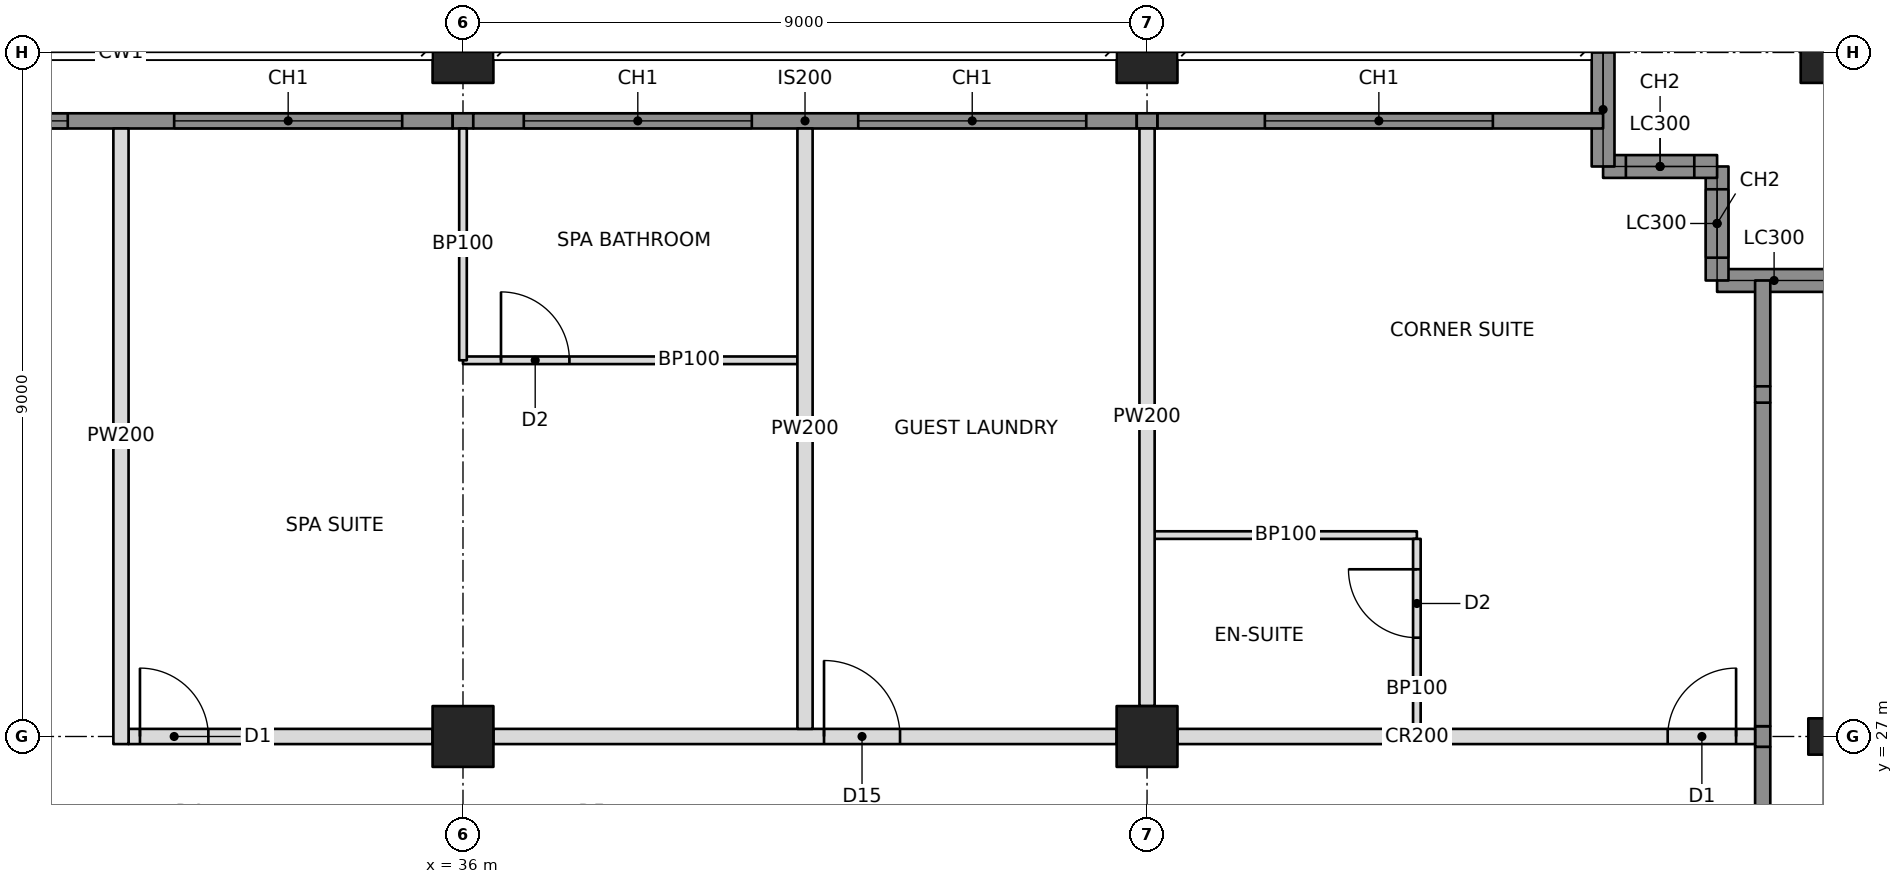
"""IFC4 building model, lengths in metres.
Left out: names, types, materials, properties, quantities, classifications, styles, units other than length and angle.
Written with IfcOpenShell. Run it as: python <this file> out.ifc"""

import sys

from ifc_helpers import new_model, si_unit, direction, frame, frame_2d, origin, origin_2d, place, context, subcontext, project, spatial, rectangle, hollow_rectangle, i_section, extrude, element, fill, save


model = new_model("IFC4")
c1 = context("Model", 3, precision=1e-05, world=origin(), true_north=direction((0.0, 1.0)))
c2 = subcontext(c1, "Body", "Model", "MODEL_VIEW")
j1 = project(units=[si_unit("LENGTHUNIT", "METRE"), si_unit("PLANEANGLEUNIT", "RADIAN")], contexts=[c1])
p1 = place(None, origin())
s1 = spatial("IfcSite", under=j1, at=p1, CompositionType="ELEMENT")
p2 = place(p1, origin())
s2 = spatial("IfcBuilding", under=s1, at=p2, CompositionType="ELEMENT")
p3 = place(p2, frame((0.0, 0.0, 51.8)))
s3 = spatial("IfcBuildingStorey", under=s2, at=p3, CompositionType="ELEMENT", Elevation=51.8)
for number, where, z_axis, x_axis in (
    (1, (36.0, 27.0, 0.0), (0.0, 0.0, 1.0), (1.0, 0.0, 0.0)),
    (2, (36.0, 36.0, 0.0), (0.0, 0.0, 1.0), (1.0, 0.0, 0.0)),
    (3, (45.0, 27.0, 0.0), (0.0, 0.0, 1.0), (0.0, 1.0, 0.0)),
    (4, (45.0, 36.0, 0.0), (0.0, 0.0, 1.0), (1.0, 0.0, 0.0)),
):
    element("IfcColumn", number, at=place(p3, frame(where, z_axis=z_axis, x_axis=x_axis)), inside=s3, PredefinedType="COLUMN", context=c2, shape_type="SweptSolid", body=[
        extrude(hollow_rectangle(XDim=0.8, YDim=0.8, WallThickness=0.1, at=origin_2d()), origin(), (0.0, 0.0, 1.0), 3.4),
    ])
p4 = place(p3, frame((54.0, 27.0, 0.0), z_axis=(0.0, 0.0, 1.0), x_axis=(0.0, 1.0, 0.0)))
e5 = element("IfcColumn", 5, at=p4, inside=s3, PredefinedType="COLUMN", context=c2, shape_type="SweptSolid", body=[
    extrude(i_section(OverallWidth=0.478, OverallDepth=0.599, WebThickness=0.1, FlangeThickness=0.14, at=origin_2d()), origin(), (0.0, 0.0, 1.0), 3.4),
])
p5 = place(p3, frame((54.0, 36.0, 0.0), z_axis=(0.0, 0.0, 1.0), x_axis=(1.0, 0.0, 0.0)))
e6 = element("IfcColumn", 6, at=p5, inside=s3, PredefinedType="COLUMN", context=c2, shape_type="SweptSolid", body=[
    extrude(hollow_rectangle(XDim=0.8, YDim=0.8, WallThickness=0.1, at=origin_2d()), origin(), (0.0, 0.0, 1.0), 3.4),
])
p6 = place(p3, frame((54.0, 33.0, 0.0), z_axis=(0.0, 0.0, 1.0), x_axis=(-1.0, 0.0, 0.0)))
e7 = element("IfcWall", 7, at=p6, inside=s3, PredefinedType="SOLIDWALL", context=c2, shape_type="SweptSolid", body=[
    extrude(rectangle(XDim=1.5, YDim=0.3, at=frame_2d((0.75, 0.0))), origin(), (0.0, 0.0, 1.0), 2.42),
])
p7 = place(p3, frame((52.5, 33.0, 0.0), z_axis=(0.0, 0.0, 1.0), x_axis=(0.0, 1.0, 0.0)))
e8 = element("IfcWall", 8, at=p7, inside=s3, PredefinedType="SOLIDWALL", context=c2, shape_type="SweptSolid", body=[
    extrude(rectangle(XDim=1.5, YDim=0.3, at=frame_2d((0.75, 0.0))), origin(), (0.0, 0.0, 1.0), 3.2),
])
p8 = place(p7, frame((0.3, 0.0, 0.6)))
e9 = element("IfcOpeningElement", 9, at=p8, cuts=e8, PredefinedType="OPENING", context=c2, shape_type="SweptSolid", body=[
    extrude(rectangle(XDim=0.9, YDim=2.2, at=frame_2d((0.45, 1.1))), frame((0.0, 0.16, 0.0), z_axis=(0.0, -1.0, 0.0), x_axis=(1.0, 0.0, 0.0)), (0.0, 0.0, 1.0), 0.32),
])
p9 = place(p3, frame((52.5, 34.5, 0.0), z_axis=(0.0, 0.0, 1.0), x_axis=(-1.0, 0.0, 0.0)))
e10 = element("IfcWall", 10, at=p9, inside=s3, PredefinedType="SOLIDWALL", context=c2, shape_type="SweptSolid", body=[
    extrude(rectangle(XDim=1.5, YDim=0.3, at=frame_2d((0.75, 0.0))), origin(), (0.0, 0.0, 1.0), 3.2),
])
p10 = place(p9, frame((0.3, 0.0, 0.6)))
e11 = element("IfcOpeningElement", 11, at=p10, cuts=e10, PredefinedType="OPENING", context=c2, shape_type="SweptSolid", body=[
    extrude(rectangle(XDim=0.9, YDim=2.2, at=frame_2d((0.45, 1.1))), frame((0.0, 0.16, 0.0), z_axis=(0.0, -1.0, 0.0), x_axis=(1.0, 0.0, 0.0)), (0.0, 0.0, 1.0), 0.32),
])
p11 = place(p3, frame((51.0, 34.5, 0.0), z_axis=(0.0, 0.0, 1.0), x_axis=(0.0, 1.0, 0.0)))
e12 = element("IfcWall", 12, at=p11, inside=s3, PredefinedType="SOLIDWALL", context=c2, shape_type="SweptSolid", body=[
    extrude(rectangle(XDim=1.5, YDim=0.3, at=frame_2d((0.75, 0.0))), origin(), (0.0, 0.0, 1.0), 2.42),
])
p12 = place(p3, frame((31.6, 27.0, 0.0), z_axis=(0.0, 0.0, 1.0), x_axis=(1.0, 0.0, 0.0)))
e13 = element("IfcWall", 13, at=p12, inside=s3, PredefinedType="PARTITIONING", context=c2, shape_type="SweptSolid", body=[
    extrude(rectangle(XDim=4.0, YDim=0.2, at=frame_2d((2.0, 0.0))), origin(), (0.0, 0.0, 1.0), 2.405),
])
p13 = place(p12, frame((0.15, 0.0, 0.0)))
e14 = element("IfcOpeningElement", 14, at=p13, cuts=e13, PredefinedType="OPENING", context=c2, shape_type="SweptSolid", body=[
    extrude(rectangle(XDim=0.9, YDim=2.1, at=frame_2d((0.45, 1.05))), frame((0.0, 0.11, 0.0), z_axis=(0.0, -1.0, 0.0), x_axis=(1.0, 0.0, 0.0)), (0.0, 0.0, 1.0), 0.22),
])
p14 = place(p3, frame((36.4, 27.0, 0.0), z_axis=(0.0, 0.0, 1.0), x_axis=(1.0, 0.0, 0.0)))
e15 = element("IfcWall", 15, at=p14, inside=s3, PredefinedType="PARTITIONING", context=c2, shape_type="SweptSolid", body=[
    extrude(rectangle(XDim=8.2, YDim=0.2, at=frame_2d((4.1, 0.0))), origin(), (0.0, 0.0, 1.0), 2.438),
])
p15 = place(p14, frame((4.35, 0.0, 0.0)))
e16 = element("IfcOpeningElement", 16, at=p15, cuts=e15, PredefinedType="OPENING", context=c2, shape_type="SweptSolid", body=[
    extrude(rectangle(XDim=1.0, YDim=2.1, at=frame_2d((0.5, 1.05))), frame((0.0, 0.11, 0.0), z_axis=(0.0, -1.0, 0.0), x_axis=(1.0, 0.0, 0.0)), (0.0, 0.0, 1.0), 0.22),
])
p16 = place(p3, frame((45.4, 27.0, 0.0), z_axis=(0.0, 0.0, 1.0), x_axis=(1.0, 0.0, 0.0)))
e17 = element("IfcWall", 17, at=p16, inside=s3, PredefinedType="PARTITIONING", context=c2, shape_type="SweptSolid", body=[
    extrude(rectangle(XDim=7.6, YDim=0.2, at=frame_2d((3.8, 0.0))), origin(), (0.0, 0.0, 1.0), 2.438),
])
p17 = place(p16, frame((6.45, 0.0, 0.0)))
e18 = element("IfcOpeningElement", 18, at=p17, cuts=e17, PredefinedType="OPENING", context=c2, shape_type="SweptSolid", body=[
    extrude(rectangle(XDim=0.9, YDim=2.1, at=frame_2d((0.45, 1.05))), frame((0.0, 0.11, 0.0), z_axis=(0.0, -1.0, 0.0), x_axis=(1.0, 0.0, 0.0)), (0.0, 0.0, 1.0), 0.22),
])
p18 = place(p3, frame((31.5, 26.9, 0.0), z_axis=(0.0, 0.0, 1.0), x_axis=(0.0, 1.0, 0.0)))
e19 = element("IfcWall", 19, at=p18, inside=s3, PredefinedType="PARTITIONING", context=c2, shape_type="SweptSolid", body=[
    extrude(rectangle(XDim=8.1, YDim=0.2, at=frame_2d((4.05, 0.0))), origin(), (0.0, 0.0, 1.0), 2.404),
])
p19 = place(p3, frame((40.5, 27.1, 0.0), z_axis=(0.0, 0.0, 1.0), x_axis=(0.0, 1.0, 0.0)))
e20 = element("IfcWall", 20, at=p19, inside=s3, PredefinedType="PARTITIONING", context=c2, shape_type="SweptSolid", body=[
    extrude(rectangle(XDim=7.9, YDim=0.2, at=frame_2d((3.95, 0.0))), origin(), (0.0, 0.0, 1.0), 2.438),
])
p20 = place(p3, frame((45.0, 27.4, 0.0), z_axis=(0.0, 0.0, 1.0), x_axis=(0.0, 1.0, 0.0)))
e21 = element("IfcWall", 21, at=p20, inside=s3, PredefinedType="PARTITIONING", context=c2, shape_type="SweptSolid", body=[
    extrude(rectangle(XDim=7.6, YDim=0.2, at=frame_2d((3.8, 0.0))), origin(), (0.0, 0.0, 1.0), 2.438),
])
p21 = place(p3, frame((36.0, 31.95, 0.0), z_axis=(0.0, 0.0, 1.0), x_axis=(1.0, 0.0, 0.0)))
e22 = element("IfcWall", 22, at=p21, inside=s3, PredefinedType="PARTITIONING", context=c2, shape_type="SweptSolid", body=[
    extrude(rectangle(XDim=4.4, YDim=0.1, at=frame_2d((2.2, 0.0))), origin(), (0.0, 0.0, 1.0), 2.438),
])
p22 = place(p21, frame((0.5, 0.0, 0.0)))
e23 = element("IfcOpeningElement", 23, at=p22, cuts=e22, PredefinedType="OPENING", context=c2, shape_type="SweptSolid", body=[
    extrude(rectangle(XDim=0.9, YDim=2.1, at=frame_2d((0.45, 1.05))), frame((0.0, 0.06, 0.0), z_axis=(0.0, -1.0, 0.0), x_axis=(1.0, 0.0, 0.0)), (0.0, 0.0, 1.0), 0.12),
])
p23 = place(p3, frame((36.0, 31.95, 0.0), z_axis=(0.0, 0.0, 1.0), x_axis=(0.0, 1.0, 0.0)))
e24 = element("IfcWall", 24, at=p23, inside=s3, PredefinedType="PARTITIONING", context=c2, shape_type="SweptSolid", body=[
    extrude(rectangle(XDim=3.05, YDim=0.1, at=frame_2d((1.525, 0.0))), origin(), (0.0, 0.0, 1.0), 2.438),
])
p24 = place(p3, frame((45.1, 29.65, 0.0), z_axis=(0.0, 0.0, 1.0), x_axis=(1.0, 0.0, 0.0)))
e25 = element("IfcWall", 25, at=p24, inside=s3, PredefinedType="PARTITIONING", context=c2, shape_type="SweptSolid", body=[
    extrude(rectangle(XDim=3.45, YDim=0.1, at=frame_2d((1.725, 0.0))), origin(), (0.0, 0.0, 1.0), 2.438),
])
p25 = place(p3, frame((48.55, 27.1, 0.0), z_axis=(0.0, 0.0, 1.0), x_axis=(0.0, 1.0, 0.0)))
e26 = element("IfcWall", 26, at=p25, inside=s3, PredefinedType="PARTITIONING", context=c2, shape_type="SweptSolid", body=[
    extrude(rectangle(XDim=2.5, YDim=0.1, at=frame_2d((1.25, 0.0))), origin(), (0.0, 0.0, 1.0), 2.438),
])
p26 = place(p25, frame((1.2, 0.0, 0.0)))
e27 = element("IfcOpeningElement", 27, at=p26, cuts=e26, PredefinedType="OPENING", context=c2, shape_type="SweptSolid", body=[
    extrude(rectangle(XDim=0.9, YDim=2.1, at=frame_2d((0.45, 1.05))), frame((0.0, 0.06, 0.0), z_axis=(0.0, -1.0, 0.0), x_axis=(1.0, 0.0, 0.0)), (0.0, 0.0, 1.0), 0.12),
])
p27 = place(p3, frame((27.194, 35.1, 0.0), z_axis=(0.0, 0.0, 1.0), x_axis=(1.0, 0.0, 0.0)))
e28 = element("IfcWall", 28, at=p27, inside=s3, PredefinedType="SOLIDWALL", context=c2, shape_type="SweptSolid", body=[
    extrude(rectangle(XDim=8.671, YDim=0.2, at=frame_2d((4.335, 0.0))), origin(), (0.0, 0.0, 1.0), 3.2),
])
p28 = place(p27, frame((0.606, 0.0, 0.6)))
e29 = element("IfcOpeningElement", 29, at=p28, cuts=e28, PredefinedType="OPENING", context=c2, shape_type="SweptSolid", body=[
    extrude(rectangle(XDim=3.0, YDim=2.2, at=frame_2d((1.5, 1.1))), frame((0.0, 0.11, 0.0), z_axis=(0.0, -1.0, 0.0), x_axis=(1.0, 0.0, 0.0)), (0.0, 0.0, 1.0), 0.22),
])
p29 = place(p27, frame((5.006, 0.0, 0.6)))
e30 = element("IfcOpeningElement", 30, at=p29, cuts=e28, PredefinedType="OPENING", context=c2, shape_type="SweptSolid", body=[
    extrude(rectangle(XDim=3.0, YDim=2.2, at=frame_2d((1.5, 1.1))), frame((0.0, 0.11, 0.0), z_axis=(0.0, -1.0, 0.0), x_axis=(1.0, 0.0, 0.0)), (0.0, 0.0, 1.0), 0.22),
])
p30 = place(p3, frame((35.865, 35.1, 0.0), z_axis=(0.0, 0.0, 1.0), x_axis=(1.0, 0.0, 0.0)))
e31 = element("IfcWall", 31, at=p30, inside=s3, PredefinedType="SOLIDWALL", context=c2, shape_type="SweptSolid", body=[
    extrude(rectangle(XDim=0.271, YDim=0.2, at=frame_2d((0.135, 0.0))), origin(), (0.0, 0.0, 1.0), 2.438),
])
p31 = place(p3, frame((36.135, 35.1, 0.0), z_axis=(0.0, 0.0, 1.0), x_axis=(1.0, 0.0, 0.0)))
e32 = element("IfcWall", 32, at=p31, inside=s3, PredefinedType="SOLIDWALL", context=c2, shape_type="SweptSolid", body=[
    extrude(rectangle(XDim=8.729, YDim=0.2, at=frame_2d((4.365, 0.0))), origin(), (0.0, 0.0, 1.0), 3.2),
])
p32 = place(p31, frame((0.665, 0.0, 0.6)))
e33 = element("IfcOpeningElement", 33, at=p32, cuts=e32, PredefinedType="OPENING", context=c2, shape_type="SweptSolid", body=[
    extrude(rectangle(XDim=3.0, YDim=2.2, at=frame_2d((1.5, 1.1))), frame((0.0, 0.11, 0.0), z_axis=(0.0, -1.0, 0.0), x_axis=(1.0, 0.0, 0.0)), (0.0, 0.0, 1.0), 0.22),
])
p33 = place(p31, frame((5.065, 0.0, 0.6)))
e34 = element("IfcOpeningElement", 34, at=p33, cuts=e32, PredefinedType="OPENING", context=c2, shape_type="SweptSolid", body=[
    extrude(rectangle(XDim=3.0, YDim=2.2, at=frame_2d((1.5, 1.1))), frame((0.0, 0.11, 0.0), z_axis=(0.0, -1.0, 0.0), x_axis=(1.0, 0.0, 0.0)), (0.0, 0.0, 1.0), 0.22),
])
p34 = place(p3, frame((44.865, 35.1, 0.0), z_axis=(0.0, 0.0, 1.0), x_axis=(1.0, 0.0, 0.0)))
e35 = element("IfcWall", 35, at=p34, inside=s3, PredefinedType="SOLIDWALL", context=c2, shape_type="SweptSolid", body=[
    extrude(rectangle(XDim=0.271, YDim=0.2, at=frame_2d((0.135, 0.0))), origin(), (0.0, 0.0, 1.0), 2.438),
])
p35 = place(p3, frame((45.135, 35.1, 0.0), z_axis=(0.0, 0.0, 1.0), x_axis=(1.0, 0.0, 0.0)))
e36 = element("IfcWall", 36, at=p35, inside=s3, PredefinedType="SOLIDWALL", context=c2, shape_type="SweptSolid", body=[
    extrude(rectangle(XDim=5.865, YDim=0.2, at=frame_2d((2.932, 0.0))), origin(), (0.0, 0.0, 1.0), 3.2),
])
p36 = place(p35, frame((1.415, 0.0, 0.6)))
e37 = element("IfcOpeningElement", 37, at=p36, cuts=e36, PredefinedType="OPENING", context=c2, shape_type="SweptSolid", body=[
    extrude(rectangle(XDim=3.0, YDim=2.2, at=frame_2d((1.5, 1.1))), frame((0.0, 0.11, 0.0), z_axis=(0.0, -1.0, 0.0), x_axis=(1.0, 0.0, 0.0)), (0.0, 0.0, 1.0), 0.22),
])
p37 = place(p3, frame((53.1, 18.135, 0.0), z_axis=(0.0, 0.0, 1.0), x_axis=(0.0, 1.0, 0.0)))
e38 = element("IfcWall", 38, at=p37, inside=s3, PredefinedType="SOLIDWALL", context=c2, shape_type="SweptSolid", body=[
    extrude(rectangle(XDim=8.729, YDim=0.2, at=frame_2d((4.365, 0.0))), origin(), (0.0, 0.0, 1.0), 3.2),
])
p38 = place(p37, frame((0.215, 0.0, 0.6)))
e39 = element("IfcOpeningElement", 39, at=p38, cuts=e38, PredefinedType="OPENING", context=c2, shape_type="SweptSolid", body=[
    extrude(rectangle(XDim=3.0, YDim=2.2, at=frame_2d((1.5, 1.1))), frame((0.0, 0.11, 0.0), z_axis=(0.0, -1.0, 0.0), x_axis=(1.0, 0.0, 0.0)), (0.0, 0.0, 1.0), 0.22),
])
p39 = place(p37, frame((3.715, 0.0, 0.6)))
e40 = element("IfcOpeningElement", 40, at=p39, cuts=e38, PredefinedType="OPENING", context=c2, shape_type="SweptSolid", body=[
    extrude(rectangle(XDim=3.0, YDim=2.2, at=frame_2d((1.5, 1.1))), frame((0.0, 0.11, 0.0), z_axis=(0.0, -1.0, 0.0), x_axis=(1.0, 0.0, 0.0)), (0.0, 0.0, 1.0), 0.22),
])
p40 = place(p3, frame((53.1, 26.865, 0.0), z_axis=(0.0, 0.0, 1.0), x_axis=(0.0, 1.0, 0.0)))
e41 = element("IfcWall", 41, at=p40, inside=s3, PredefinedType="SOLIDWALL", context=c2, shape_type="SweptSolid", body=[
    extrude(rectangle(XDim=0.271, YDim=0.2, at=frame_2d((0.135, 0.0))), origin(), (0.0, 0.0, 1.0), 2.438),
])
p41 = place(p3, frame((53.1, 27.135, 0.0), z_axis=(0.0, 0.0, 1.0), x_axis=(0.0, 1.0, 0.0)))
e42 = element("IfcWall", 42, at=p41, inside=s3, PredefinedType="SOLIDWALL", context=c2, shape_type="SweptSolid", body=[
    extrude(rectangle(XDim=4.257, YDim=0.2, at=frame_2d((2.129, 0.0))), origin(), (0.0, 0.0, 1.0), 3.2),
])
p42 = place(p3, frame((53.1, 31.393, 0.0), z_axis=(0.0, 0.0, 1.0), x_axis=(0.0, 1.0, 0.0)))
e43 = element("IfcWall", 43, at=p42, inside=s3, PredefinedType="SOLIDWALL", context=c2, shape_type="SweptSolid", body=[
    extrude(rectangle(XDim=0.215, YDim=0.2, at=frame_2d((0.107, 0.0))), origin(), (0.0, 0.0, 1.0), 2.661),
])
p43 = place(p3, frame((53.1, 31.607, 0.0), z_axis=(0.0, 0.0, 1.0), x_axis=(0.0, 1.0, 0.0)))
e44 = element("IfcWall", 44, at=p43, inside=s3, PredefinedType="SOLIDWALL", context=c2, shape_type="SweptSolid", body=[
    extrude(rectangle(XDim=1.393, YDim=0.2, at=frame_2d((0.696, 0.0))), origin(), (0.0, 0.0, 1.0), 3.2),
])
p44 = place(p8, origin())
e45 = element("IfcWindow", 45, at=p44, inside=s3, PartitioningType="SINGLE_PANEL", PredefinedType="WINDOW", context=c2, shape_type="SweptSolid", body=[
    extrude(rectangle(XDim=0.9, YDim=2.2, at=frame_2d((0.45, 1.1))), frame((0.0, 0.03, 0.0), z_axis=(0.0, -1.0, 0.0), x_axis=(1.0, 0.0, 0.0)), (0.0, 0.0, 1.0), 0.06),
])
fill(e9, e45)
p45 = place(p10, origin())
e46 = element("IfcWindow", 46, at=p45, inside=s3, PartitioningType="SINGLE_PANEL", PredefinedType="WINDOW", context=c2, shape_type="SweptSolid", body=[
    extrude(rectangle(XDim=0.9, YDim=2.2, at=frame_2d((0.45, 1.1))), frame((0.0, 0.03, 0.0), z_axis=(0.0, -1.0, 0.0), x_axis=(1.0, 0.0, 0.0)), (0.0, 0.0, 1.0), 0.06),
])
fill(e11, e46)
p46 = place(p28, origin())
e47 = element("IfcWindow", 47, at=p46, inside=s3, PartitioningType="TRIPLE_PANEL_VERTICAL", PredefinedType="WINDOW", context=c2, shape_type="SweptSolid", body=[
    extrude(rectangle(XDim=3.0, YDim=2.2, at=frame_2d((1.5, 1.1))), frame((0.0, 0.03, 0.0), z_axis=(0.0, -1.0, 0.0), x_axis=(1.0, 0.0, 0.0)), (0.0, 0.0, 1.0), 0.06),
])
fill(e29, e47)
p47 = place(p29, origin())
e48 = element("IfcWindow", 48, at=p47, inside=s3, PartitioningType="TRIPLE_PANEL_VERTICAL", PredefinedType="WINDOW", context=c2, shape_type="SweptSolid", body=[
    extrude(rectangle(XDim=3.0, YDim=2.2, at=frame_2d((1.5, 1.1))), frame((0.0, 0.03, 0.0), z_axis=(0.0, -1.0, 0.0), x_axis=(1.0, 0.0, 0.0)), (0.0, 0.0, 1.0), 0.06),
])
fill(e30, e48)
p48 = place(p32, origin())
e49 = element("IfcWindow", 49, at=p48, inside=s3, PartitioningType="TRIPLE_PANEL_VERTICAL", PredefinedType="WINDOW", context=c2, shape_type="SweptSolid", body=[
    extrude(rectangle(XDim=3.0, YDim=2.2, at=frame_2d((1.5, 1.1))), frame((0.0, 0.03, 0.0), z_axis=(0.0, -1.0, 0.0), x_axis=(1.0, 0.0, 0.0)), (0.0, 0.0, 1.0), 0.06),
])
fill(e33, e49)
p49 = place(p33, origin())
e50 = element("IfcWindow", 50, at=p49, inside=s3, PartitioningType="TRIPLE_PANEL_VERTICAL", PredefinedType="WINDOW", context=c2, shape_type="SweptSolid", body=[
    extrude(rectangle(XDim=3.0, YDim=2.2, at=frame_2d((1.5, 1.1))), frame((0.0, 0.03, 0.0), z_axis=(0.0, -1.0, 0.0), x_axis=(1.0, 0.0, 0.0)), (0.0, 0.0, 1.0), 0.06),
])
fill(e34, e50)
p50 = place(p36, origin())
e51 = element("IfcWindow", 51, at=p50, inside=s3, PartitioningType="TRIPLE_PANEL_VERTICAL", PredefinedType="WINDOW", context=c2, shape_type="SweptSolid", body=[
    extrude(rectangle(XDim=3.0, YDim=2.2, at=frame_2d((1.5, 1.1))), frame((0.0, 0.03, 0.0), z_axis=(0.0, -1.0, 0.0), x_axis=(1.0, 0.0, 0.0)), (0.0, 0.0, 1.0), 0.06),
])
fill(e37, e51)
p51 = place(p22, origin())
e52 = element("IfcDoor", 52, at=p51, inside=s3, OperationType="SINGLE_SWING_LEFT", PredefinedType="DOOR", context=c2, shape_type="SweptSolid", body=[
    extrude(rectangle(XDim=0.9, YDim=2.1, at=frame_2d((0.45, 1.05))), frame((0.0, 0.025, 0.0), z_axis=(0.0, -1.0, 0.0), x_axis=(1.0, 0.0, 0.0)), (0.0, 0.0, 1.0), 0.05),
])
fill(e23, e52)
p52 = place(p13, origin())
e53 = element("IfcDoor", 53, at=p52, inside=s3, OperationType="SINGLE_SWING_LEFT", PredefinedType="DOOR", context=c2, shape_type="SweptSolid", body=[
    extrude(rectangle(XDim=0.9, YDim=2.1, at=frame_2d((0.45, 1.05))), frame((0.0, 0.025, 0.0), z_axis=(0.0, -1.0, 0.0), x_axis=(1.0, 0.0, 0.0)), (0.0, 0.0, 1.0), 0.05),
])
fill(e14, e53)
p53 = place(p15, origin())
e54 = element("IfcDoor", 54, at=p53, inside=s3, OperationType="SINGLE_SWING_LEFT", PredefinedType="DOOR", context=c2, shape_type="SweptSolid", body=[
    extrude(rectangle(XDim=1.0, YDim=2.1, at=frame_2d((0.5, 1.05))), frame((0.0, 0.025, 0.0), z_axis=(0.0, -1.0, 0.0), x_axis=(1.0, 0.0, 0.0)), (0.0, 0.0, 1.0), 0.05),
])
fill(e16, e54)
p54 = place(p26, origin())
e55 = element("IfcDoor", 55, at=p54, inside=s3, OperationType="SINGLE_SWING_RIGHT", PredefinedType="DOOR", context=c2, shape_type="SweptSolid", body=[
    extrude(rectangle(XDim=0.9, YDim=2.1, at=frame_2d((0.45, 1.05))), frame((0.0, 0.025, 0.0), z_axis=(0.0, -1.0, 0.0), x_axis=(1.0, 0.0, 0.0)), (0.0, 0.0, 1.0), 0.05),
])
fill(e27, e55)
p55 = place(p17, origin())
e56 = element("IfcDoor", 56, at=p55, inside=s3, OperationType="SINGLE_SWING_RIGHT", PredefinedType="DOOR", context=c2, shape_type="SweptSolid", body=[
    extrude(rectangle(XDim=0.9, YDim=2.1, at=frame_2d((0.45, 1.05))), frame((0.0, 0.025, 0.0), z_axis=(0.0, -1.0, 0.0), x_axis=(1.0, 0.0, 0.0)), (0.0, 0.0, 1.0), 0.05),
])
fill(e18, e56)
save(model, sys.argv[1])
